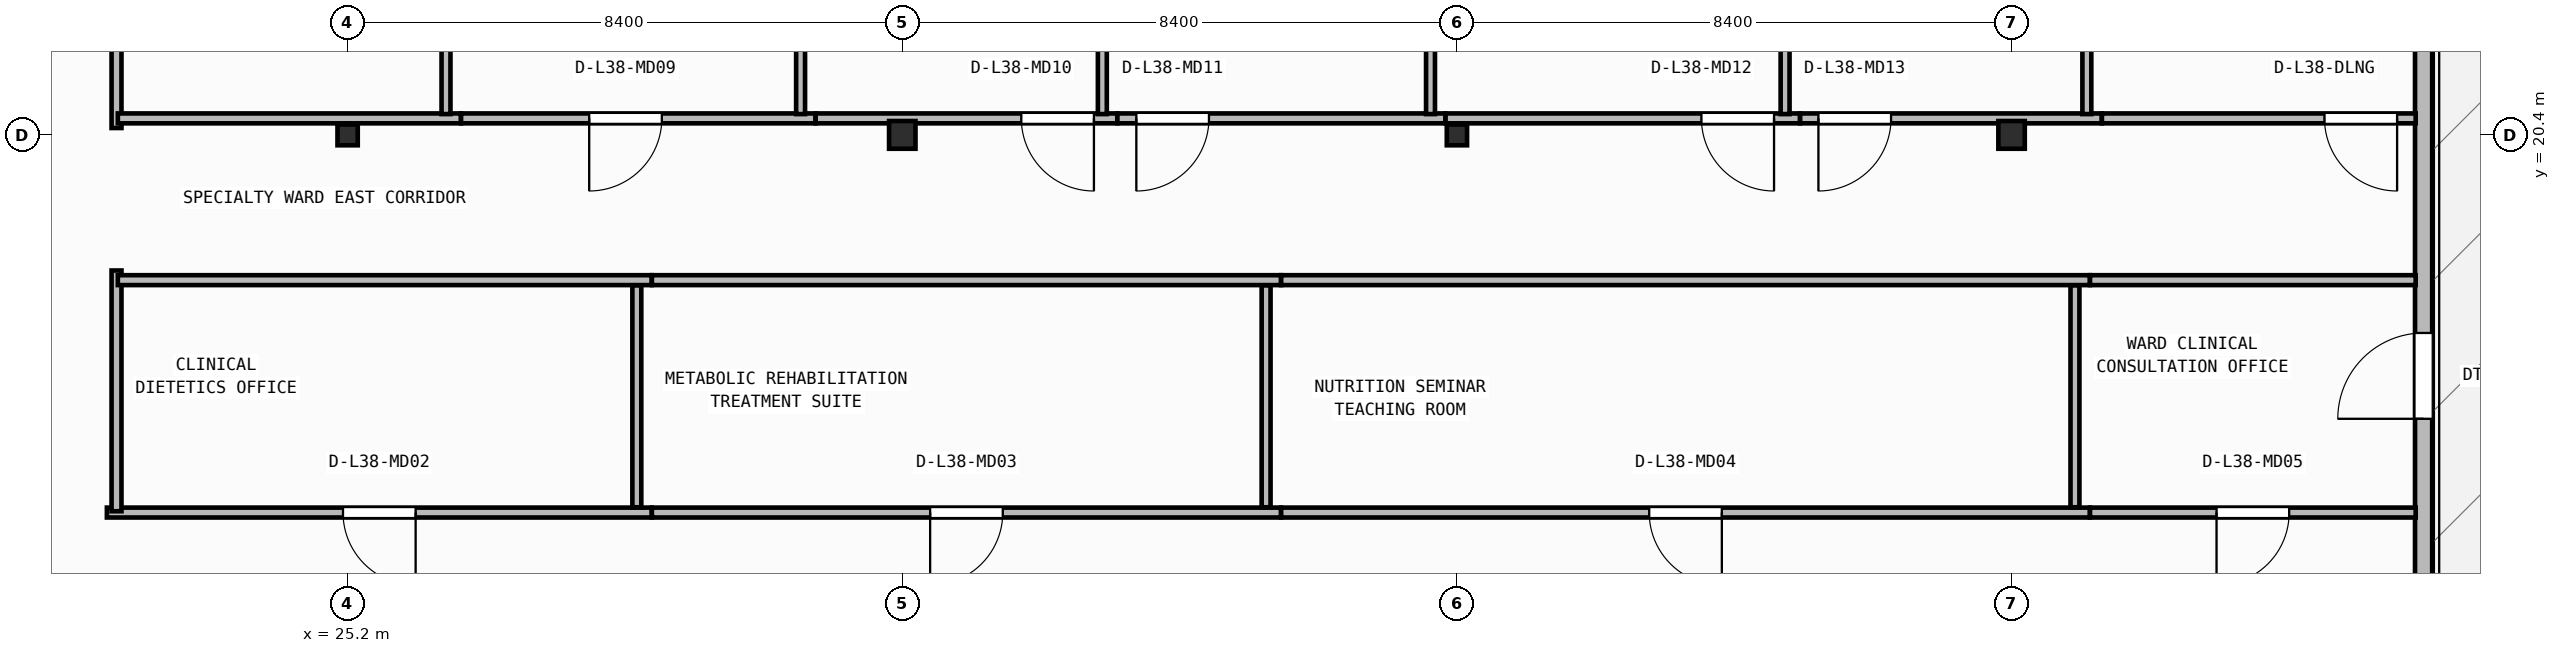
"""IFC4 building model, lengths in metres.
Left out: names, types, materials, properties, quantities, classifications, styles, units other than length and angle.
Written with IfcOpenShell. Run it as: python <this file> out.ifc"""

import sys

from ifc_helpers import new_model, si_unit, direction, frame, frame_2d, origin, origin_2d, place, context, subcontext, project, spatial, rectangle, i_section, extrude, element, fill, save


model = new_model("IFC4")
c1 = context("Model", 3, precision=1e-05, world=origin(), true_north=direction((0.0, 1.0)))
c2 = subcontext(c1, "Body", "Model", "MODEL_VIEW")
j1 = project(units=[si_unit("LENGTHUNIT", "METRE"), si_unit("PLANEANGLEUNIT", "RADIAN")], contexts=[c1])
p1 = place(None, origin())
s1 = spatial("IfcSite", under=j1, at=p1, CompositionType="ELEMENT")
p2 = place(p1, origin())
s2 = spatial("IfcBuilding", under=s1, at=p2, CompositionType="ELEMENT")
p3 = place(p2, frame((0.0, 0.0, 154.7)))
s3 = spatial("IfcBuildingStorey", under=s2, at=p3, CompositionType="ELEMENT", Elevation=154.7)
p4 = place(p3, frame((25.2, 20.4, 0.0), z_axis=(0.0, 0.0, 1.0), x_axis=(1.0, 0.0, 0.0)))
e1 = element("IfcColumn", 1, at=p4, inside=s3, PredefinedType="COLUMN", context=c2, shape_type="SweptSolid", body=[
    extrude(i_section(OverallWidth=0.307, OverallDepth=0.315, WebThickness=0.012, FlangeThickness=0.019, FilletRadius=0.017, at=origin_2d()), origin(), (0.0, 0.0, 1.0), 3.95),
])
p5 = place(p3, frame((33.6, 20.4, 0.0), z_axis=(0.0, 0.0, 1.0), x_axis=(1.0, 0.0, 0.0)))
e2 = element("IfcColumn", 2, at=p5, inside=s3, PredefinedType="COLUMN", context=c2, shape_type="SweptSolid", body=[
    extrude(i_section(OverallWidth=0.4, OverallDepth=0.42, WebThickness=0.025, FlangeThickness=0.04, at=origin_2d()), origin(), (0.0, 0.0, 1.0), 3.95),
])
p6 = place(p3, frame((42.0, 20.4, 0.0), z_axis=(0.0, 0.0, 1.0), x_axis=(1.0, 0.0, 0.0)))
e3 = element("IfcColumn", 3, at=p6, inside=s3, PredefinedType="COLUMN", context=c2, shape_type="SweptSolid", body=[
    extrude(i_section(OverallWidth=0.307, OverallDepth=0.315, WebThickness=0.012, FlangeThickness=0.019, FilletRadius=0.017, at=origin_2d()), origin(), (0.0, 0.0, 1.0), 3.95),
])
p7 = place(p3, frame((50.4, 20.4, 0.0), z_axis=(0.0, 0.0, 1.0), x_axis=(1.0, 0.0, 0.0)))
e4 = element("IfcColumn", 4, at=p7, inside=s3, PredefinedType="COLUMN", context=c2, shape_type="SweptSolid", body=[
    extrude(i_section(OverallWidth=0.4, OverallDepth=0.42, WebThickness=0.025, FlangeThickness=0.04, at=origin_2d()), origin(), (0.0, 0.0, 1.0), 3.95),
])
p8 = place(p3, frame((56.64, 6.86, 0.0), z_axis=(0.0, 0.0, 1.0), x_axis=(0.0, 1.0, 0.0)))
e5 = element("IfcWall", 5, at=p8, inside=s3, PredefinedType="STANDARD", context=c2, shape_type="SweptSolid", body=[
    extrude(rectangle(XDim=23.48, YDim=0.26, at=frame_2d((11.74, 0.0))), origin(), (0.0, 0.0, 1.0), 3.71),
])
p9 = place(p8, frame((9.24, 0.0, 0.0)))
e6 = element("IfcOpeningElement", 6, at=p9, cuts=e5, PredefinedType="OPENING", context=c2, shape_type="SweptSolid", body=[
    extrude(rectangle(XDim=1.3, YDim=2.15, at=frame_2d((0.65, 1.075))), frame((0.0, 0.14, 0.0), z_axis=(0.0, -1.0, 0.0), x_axis=(1.0, 0.0, 0.0)), (0.0, 0.0, 1.0), 0.28),
])
p10 = place(p3, frame((29.806, 14.68, 0.0), z_axis=(0.0, 0.0, 1.0), x_axis=(-1.0, 0.0, 0.0)))
e7 = element("IfcWall", 7, at=p10, inside=s3, PredefinedType="PARTITIONING", context=c2, shape_type="SweptSolid", body=[
    extrude(rectangle(XDim=8.252, YDim=0.15, at=frame_2d((4.126, 0.0))), origin(), (0.0, 0.0, 1.0), 3.71),
])
p11 = place(p10, frame((3.576, 0.0, 0.0)))
e8 = element("IfcOpeningElement", 8, at=p11, cuts=e7, PredefinedType="OPENING", context=c2, shape_type="SweptSolid", body=[
    extrude(rectangle(XDim=1.1, YDim=2.1, at=frame_2d((0.55, 1.05))), frame((0.0, 0.085, 0.0), z_axis=(0.0, -1.0, 0.0), x_axis=(1.0, 0.0, 0.0)), (0.0, 0.0, 1.0), 0.17),
])
p12 = place(p3, frame((39.336, 14.68, 0.0), z_axis=(0.0, 0.0, 1.0), x_axis=(-1.0, 0.0, 0.0)))
e9 = element("IfcWall", 9, at=p12, inside=s3, PredefinedType="PARTITIONING", context=c2, shape_type="SweptSolid", body=[
    extrude(rectangle(XDim=9.528, YDim=0.15, at=frame_2d((4.764, 0.0))), origin(), (0.0, 0.0, 1.0), 3.71),
])
p13 = place(p12, frame((4.214, 0.0, 0.0)))
e10 = element("IfcOpeningElement", 10, at=p13, cuts=e9, PredefinedType="OPENING", context=c2, shape_type="SweptSolid", body=[
    extrude(rectangle(XDim=1.1, YDim=2.1, at=frame_2d((0.55, 1.05))), frame((0.0, 0.085, 0.0), z_axis=(0.0, -1.0, 0.0), x_axis=(1.0, 0.0, 0.0)), (0.0, 0.0, 1.0), 0.17),
])
p14 = place(p3, frame((51.586, 14.68, 0.0), z_axis=(0.0, 0.0, 1.0), x_axis=(-1.0, 0.0, 0.0)))
e11 = element("IfcWall", 11, at=p14, inside=s3, PredefinedType="PARTITIONING", context=c2, shape_type="SweptSolid", body=[
    extrude(rectangle(XDim=12.248, YDim=0.15, at=frame_2d((6.124, 0.0))), origin(), (0.0, 0.0, 1.0), 3.71),
])
p15 = place(p14, frame((5.574, 0.0, 0.0)))
e12 = element("IfcOpeningElement", 12, at=p15, cuts=e11, PredefinedType="OPENING", context=c2, shape_type="SweptSolid", body=[
    extrude(rectangle(XDim=1.1, YDim=2.1, at=frame_2d((0.55, 1.05))), frame((0.0, 0.085, 0.0), z_axis=(0.0, -1.0, 0.0), x_axis=(1.0, 0.0, 0.0)), (0.0, 0.0, 1.0), 0.17),
])
p16 = place(p3, frame((56.52, 14.68, 0.0), z_axis=(0.0, 0.0, 1.0), x_axis=(-1.0, 0.0, 0.0)))
e13 = element("IfcWall", 13, at=p16, inside=s3, PredefinedType="PARTITIONING", context=c2, shape_type="SweptSolid", body=[
    extrude(rectangle(XDim=4.932, YDim=0.15, at=frame_2d((2.466, 0.0))), origin(), (0.0, 0.0, 1.0), 3.71),
])
p17 = place(p16, frame((1.916, 0.0, 0.0)))
e14 = element("IfcOpeningElement", 14, at=p17, cuts=e13, PredefinedType="OPENING", context=c2, shape_type="SweptSolid", body=[
    extrude(rectangle(XDim=1.1, YDim=2.1, at=frame_2d((0.55, 1.05))), frame((0.0, 0.085, 0.0), z_axis=(0.0, -1.0, 0.0), x_axis=(1.0, 0.0, 0.0)), (0.0, 0.0, 1.0), 0.17),
])
p18 = place(p3, frame((21.7, 14.7, 0.0), z_axis=(0.0, 0.0, 1.0), x_axis=(0.0, 1.0, 0.0)))
e15 = element("IfcWall", 15, at=p18, inside=s3, PredefinedType="PARTITIONING", context=c2, shape_type="SweptSolid", body=[
    extrude(rectangle(XDim=3.646, YDim=0.15, at=frame_2d((1.823, 0.0))), origin(), (0.0, 0.0, 1.0), 3.71),
])
p19 = place(p3, frame((21.7, 20.504, 0.0), z_axis=(0.0, 0.0, 1.0), x_axis=(0.0, 1.0, 0.0)))
e16 = element("IfcWall", 16, at=p19, inside=s3, PredefinedType="PARTITIONING", context=c2, shape_type="SweptSolid", body=[
    extrude(rectangle(XDim=6.756, YDim=0.15, at=frame_2d((3.378, 0.0))), origin(), (0.0, 0.0, 1.0), 3.71),
])
p20 = place(p19, frame((2.828, 0.0, 0.0)))
e17 = element("IfcOpeningElement", 17, at=p20, cuts=e16, PredefinedType="OPENING", context=c2, shape_type="SweptSolid", body=[
    extrude(rectangle(XDim=1.1, YDim=2.1, at=frame_2d((0.55, 1.05))), frame((0.0, 0.085, 0.0), z_axis=(0.0, -1.0, 0.0), x_axis=(1.0, 0.0, 0.0)), (0.0, 0.0, 1.0), 0.17),
])
p21 = place(p3, frame((21.72, 18.2, 0.0), z_axis=(0.0, 0.0, 1.0), x_axis=(1.0, 0.0, 0.0)))
e18 = element("IfcWall", 18, at=p21, inside=s3, PredefinedType="PARTITIONING", context=c2, shape_type="SweptSolid", body=[
    extrude(rectangle(XDim=8.086, YDim=0.15, at=frame_2d((4.043, 0.0))), origin(), (0.0, 0.0, 1.0), 3.71),
])
p22 = place(p3, frame((29.808, 18.2, 0.0), z_axis=(0.0, 0.0, 1.0), x_axis=(1.0, 0.0, 0.0)))
e19 = element("IfcWall", 19, at=p22, inside=s3, PredefinedType="PARTITIONING", context=c2, shape_type="SweptSolid", body=[
    extrude(rectangle(XDim=9.528, YDim=0.15, at=frame_2d((4.764, 0.0))), origin(), (0.0, 0.0, 1.0), 3.71),
])
p23 = place(p3, frame((39.338, 18.2, 0.0), z_axis=(0.0, 0.0, 1.0), x_axis=(1.0, 0.0, 0.0)))
e20 = element("IfcWall", 20, at=p23, inside=s3, PredefinedType="PARTITIONING", context=c2, shape_type="SweptSolid", body=[
    extrude(rectangle(XDim=12.248, YDim=0.15, at=frame_2d((6.124, 0.0))), origin(), (0.0, 0.0, 1.0), 3.71),
])
p24 = place(p3, frame((51.588, 18.2, 0.0), z_axis=(0.0, 0.0, 1.0), x_axis=(1.0, 0.0, 0.0)))
e21 = element("IfcWall", 21, at=p24, inside=s3, PredefinedType="PARTITIONING", context=c2, shape_type="SweptSolid", body=[
    extrude(rectangle(XDim=4.932, YDim=0.15, at=frame_2d((2.466, 0.0))), origin(), (0.0, 0.0, 1.0), 3.71),
])
p25 = place(p3, frame((26.916, 20.65, 0.0), z_axis=(0.0, 0.0, 1.0), x_axis=(-1.0, 0.0, 0.0)))
e22 = element("IfcWall", 22, at=p25, inside=s3, PredefinedType="PARTITIONING", context=c2, shape_type="SweptSolid", body=[
    extrude(rectangle(XDim=5.196, YDim=0.15, at=frame_2d((2.598, 0.0))), origin(), (0.0, 0.0, 1.0), 3.083),
])
p26 = place(p3, frame((32.286, 20.65, 0.0), z_axis=(0.0, 0.0, 1.0), x_axis=(-1.0, 0.0, 0.0)))
e23 = element("IfcWall", 23, at=p26, inside=s3, PredefinedType="PARTITIONING", context=c2, shape_type="SweptSolid", body=[
    extrude(rectangle(XDim=5.368, YDim=0.15, at=frame_2d((2.684, 0.0))), origin(), (0.0, 0.0, 1.0), 3.083),
])
p27 = place(p26, frame((2.327, 0.0, 0.0)))
e24 = element("IfcOpeningElement", 24, at=p27, cuts=e23, PredefinedType="OPENING", context=c2, shape_type="SweptSolid", body=[
    extrude(rectangle(XDim=1.1, YDim=2.1, at=frame_2d((0.55, 1.05))), frame((0.0, 0.085, 0.0), z_axis=(0.0, -1.0, 0.0), x_axis=(1.0, 0.0, 0.0)), (0.0, 0.0, 1.0), 0.17),
])
p28 = place(p3, frame((36.856, 20.65, 0.0), z_axis=(0.0, 0.0, 1.0), x_axis=(-1.0, 0.0, 0.0)))
e25 = element("IfcWall", 25, at=p28, inside=s3, PredefinedType="PARTITIONING", context=c2, shape_type="SweptSolid", body=[
    extrude(rectangle(XDim=4.568, YDim=0.15, at=frame_2d((2.284, 0.0))), origin(), (0.0, 0.0, 1.0), 3.083),
])
p29 = place(p28, frame((0.354, 0.0, 0.0)))
e26 = element("IfcOpeningElement", 26, at=p29, cuts=e25, PredefinedType="OPENING", context=c2, shape_type="SweptSolid", body=[
    extrude(rectangle(XDim=1.1, YDim=2.1, at=frame_2d((0.55, 1.05))), frame((0.0, 0.085, 0.0), z_axis=(0.0, -1.0, 0.0), x_axis=(1.0, 0.0, 0.0)), (0.0, 0.0, 1.0), 0.17),
])
p30 = place(p3, frame((41.826, 20.65, 0.0), z_axis=(0.0, 0.0, 1.0), x_axis=(-1.0, 0.0, 0.0)))
e27 = element("IfcWall", 27, at=p30, inside=s3, PredefinedType="PARTITIONING", context=c2, shape_type="SweptSolid", body=[
    extrude(rectangle(XDim=4.968, YDim=0.15, at=frame_2d((2.484, 0.0))), origin(), (0.0, 0.0, 1.0), 3.083),
])
p31 = place(p30, frame((3.581, 0.0, 0.0)))
e28 = element("IfcOpeningElement", 28, at=p31, cuts=e27, PredefinedType="OPENING", context=c2, shape_type="SweptSolid", body=[
    extrude(rectangle(XDim=1.1, YDim=2.1, at=frame_2d((0.55, 1.05))), frame((0.0, 0.085, 0.0), z_axis=(0.0, -1.0, 0.0), x_axis=(1.0, 0.0, 0.0)), (0.0, 0.0, 1.0), 0.17),
])
p32 = place(p3, frame((47.196, 20.65, 0.0), z_axis=(0.0, 0.0, 1.0), x_axis=(-1.0, 0.0, 0.0)))
e29 = element("IfcWall", 29, at=p32, inside=s3, PredefinedType="PARTITIONING", context=c2, shape_type="SweptSolid", body=[
    extrude(rectangle(XDim=5.368, YDim=0.15, at=frame_2d((2.684, 0.0))), origin(), (0.0, 0.0, 1.0), 3.083),
])
p33 = place(p32, frame((0.393, 0.0, 0.0)))
e30 = element("IfcOpeningElement", 30, at=p33, cuts=e29, PredefinedType="OPENING", context=c2, shape_type="SweptSolid", body=[
    extrude(rectangle(XDim=1.1, YDim=2.1, at=frame_2d((0.55, 1.05))), frame((0.0, 0.085, 0.0), z_axis=(0.0, -1.0, 0.0), x_axis=(1.0, 0.0, 0.0)), (0.0, 0.0, 1.0), 0.17),
])
p34 = place(p3, frame((51.766, 20.65, 0.0), z_axis=(0.0, 0.0, 1.0), x_axis=(-1.0, 0.0, 0.0)))
e31 = element("IfcWall", 31, at=p34, inside=s3, PredefinedType="PARTITIONING", context=c2, shape_type="SweptSolid", body=[
    extrude(rectangle(XDim=4.568, YDim=0.15, at=frame_2d((2.284, 0.0))), origin(), (0.0, 0.0, 1.0), 3.083),
])
p35 = place(p34, frame((3.191, 0.0, 0.0)))
e32 = element("IfcOpeningElement", 32, at=p35, cuts=e31, PredefinedType="OPENING", context=c2, shape_type="SweptSolid", body=[
    extrude(rectangle(XDim=1.1, YDim=2.1, at=frame_2d((0.55, 1.05))), frame((0.0, 0.085, 0.0), z_axis=(0.0, -1.0, 0.0), x_axis=(1.0, 0.0, 0.0)), (0.0, 0.0, 1.0), 0.17),
])
p36 = place(p3, frame((56.52, 20.65, 0.0), z_axis=(0.0, 0.0, 1.0), x_axis=(-1.0, 0.0, 0.0)))
e33 = element("IfcWall", 33, at=p36, inside=s3, PredefinedType="PARTITIONING", context=c2, shape_type="SweptSolid", body=[
    extrude(rectangle(XDim=4.752, YDim=0.15, at=frame_2d((2.376, 0.0))), origin(), (0.0, 0.0, 1.0), 3.71),
])
p37 = place(p36, frame((0.281, 0.0, 0.0)))
e34 = element("IfcOpeningElement", 34, at=p37, cuts=e33, PredefinedType="OPENING", context=c2, shape_type="SweptSolid", body=[
    extrude(rectangle(XDim=1.1, YDim=2.1, at=frame_2d((0.55, 1.05))), frame((0.0, 0.085, 0.0), z_axis=(0.0, -1.0, 0.0), x_axis=(1.0, 0.0, 0.0)), (0.0, 0.0, 1.0), 0.17),
])
for number, where, z_axis, x_axis in (
    (35, (29.58, 14.76, 0.0), (0.0, 0.0, 1.0), (0.0, 1.0, 0.0)),
    (36, (39.11, 14.76, 0.0), (0.0, 0.0, 1.0), (0.0, 1.0, 0.0)),
    (37, (51.36, 14.76, 0.0), (0.0, 0.0, 1.0), (0.0, 1.0, 0.0)),
):
    element("IfcWall", number, at=place(p3, frame(where, z_axis=z_axis, x_axis=x_axis)), inside=s3, PredefinedType="PARTITIONING", context=c2, shape_type="SweptSolid", body=[
        extrude(rectangle(XDim=3.36, YDim=0.135, at=frame_2d((1.68, 0.0))), origin(), (0.0, 0.0, 1.0), 3.71),
    ])
for number, where, z_axis, x_axis in (
    (38, (26.69, 20.715, 0.0), (0.0, 0.0, 1.0), (0.0, 1.0, 0.0)),
    (39, (32.06, 20.715, 0.0), (0.0, 0.0, 1.0), (0.0, 1.0, 0.0)),
    (40, (36.63, 20.715, 0.0), (0.0, 0.0, 1.0), (0.0, 1.0, 0.0)),
):
    element("IfcWall", number, at=place(p3, frame(where, z_axis=z_axis, x_axis=x_axis)), inside=s3, PredefinedType="PARTITIONING", context=c2, shape_type="SweptSolid", body=[
        extrude(rectangle(XDim=6.385, YDim=0.135, at=frame_2d((3.192, 0.0))), origin(), (0.0, 0.0, 1.0), 3.71),
    ])
p38 = place(p3, frame((41.6, 20.715, 0.0), z_axis=(0.0, 0.0, 1.0), x_axis=(0.0, 1.0, 0.0)))
e41 = element("IfcWall", 41, at=p38, inside=s3, PredefinedType="PARTITIONING", context=c2, shape_type="SweptSolid", body=[
    extrude(rectangle(XDim=6.385, YDim=0.135, at=frame_2d((3.192, 0.0))), origin(), (0.0, 0.0, 1.0), 3.152),
])
for number, where, z_axis, x_axis in (
    (42, (46.97, 20.715, 0.0), (0.0, 0.0, 1.0), (0.0, 1.0, 0.0)),
    (43, (51.54, 20.715, 0.0), (0.0, 0.0, 1.0), (0.0, 1.0, 0.0)),
):
    element("IfcWall", number, at=place(p3, frame(where, z_axis=z_axis, x_axis=x_axis)), inside=s3, PredefinedType="PARTITIONING", context=c2, shape_type="SweptSolid", body=[
        extrude(rectangle(XDim=6.385, YDim=0.135, at=frame_2d((3.192, 0.0))), origin(), (0.0, 0.0, 1.0), 3.71),
    ])
p39 = place(p9, origin())
e44 = element("IfcDoor", 44, at=p39, inside=s3, OperationType="SINGLE_SWING_LEFT", PredefinedType="DOOR", context=c2, shape_type="SweptSolid", body=[
    extrude(rectangle(XDim=1.3, YDim=2.15, at=frame_2d((0.65, 1.075))), frame((0.0, 0.025, 0.0), z_axis=(0.0, -1.0, 0.0), x_axis=(1.0, 0.0, 0.0)), (0.0, 0.0, 1.0), 0.05),
])
fill(e6, e44)
p40 = place(p11, origin())
e45 = element("IfcDoor", 45, at=p40, inside=s3, OperationType="SINGLE_SWING_LEFT", PredefinedType="DOOR", context=c2, shape_type="SweptSolid", body=[
    extrude(rectangle(XDim=1.1, YDim=2.1, at=frame_2d((0.55, 1.05))), frame((0.0, 0.025, 0.0), z_axis=(0.0, -1.0, 0.0), x_axis=(1.0, 0.0, 0.0)), (0.0, 0.0, 1.0), 0.05),
])
fill(e8, e45)
p41 = place(p13, origin())
e46 = element("IfcDoor", 46, at=p41, inside=s3, OperationType="SINGLE_SWING_RIGHT", PredefinedType="DOOR", context=c2, shape_type="SweptSolid", body=[
    extrude(rectangle(XDim=1.1, YDim=2.1, at=frame_2d((0.55, 1.05))), frame((0.0, 0.025, 0.0), z_axis=(0.0, -1.0, 0.0), x_axis=(1.0, 0.0, 0.0)), (0.0, 0.0, 1.0), 0.05),
])
fill(e10, e46)
p42 = place(p15, origin())
e47 = element("IfcDoor", 47, at=p42, inside=s3, OperationType="SINGLE_SWING_LEFT", PredefinedType="DOOR", context=c2, shape_type="SweptSolid", body=[
    extrude(rectangle(XDim=1.1, YDim=2.1, at=frame_2d((0.55, 1.05))), frame((0.0, 0.025, 0.0), z_axis=(0.0, -1.0, 0.0), x_axis=(1.0, 0.0, 0.0)), (0.0, 0.0, 1.0), 0.05),
])
fill(e12, e47)
p43 = place(p17, origin())
e48 = element("IfcDoor", 48, at=p43, inside=s3, OperationType="SINGLE_SWING_RIGHT", PredefinedType="DOOR", context=c2, shape_type="SweptSolid", body=[
    extrude(rectangle(XDim=1.1, YDim=2.1, at=frame_2d((0.55, 1.05))), frame((0.0, 0.025, 0.0), z_axis=(0.0, -1.0, 0.0), x_axis=(1.0, 0.0, 0.0)), (0.0, 0.0, 1.0), 0.05),
])
fill(e14, e48)
p44 = place(p27, origin())
e49 = element("IfcDoor", 49, at=p44, inside=s3, OperationType="SINGLE_SWING_RIGHT", PredefinedType="DOOR", context=c2, shape_type="SweptSolid", body=[
    extrude(rectangle(XDim=1.1, YDim=2.1, at=frame_2d((0.55, 1.05))), frame((0.0, 0.025, 0.0), z_axis=(0.0, -1.0, 0.0), x_axis=(1.0, 0.0, 0.0)), (0.0, 0.0, 1.0), 0.05),
])
fill(e24, e49)
p45 = place(p29, origin())
e50 = element("IfcDoor", 50, at=p45, inside=s3, OperationType="SINGLE_SWING_LEFT", PredefinedType="DOOR", context=c2, shape_type="SweptSolid", body=[
    extrude(rectangle(XDim=1.1, YDim=2.1, at=frame_2d((0.55, 1.05))), frame((0.0, 0.025, 0.0), z_axis=(0.0, -1.0, 0.0), x_axis=(1.0, 0.0, 0.0)), (0.0, 0.0, 1.0), 0.05),
])
fill(e26, e50)
p46 = place(p31, origin())
e51 = element("IfcDoor", 51, at=p46, inside=s3, OperationType="SINGLE_SWING_RIGHT", PredefinedType="DOOR", context=c2, shape_type="SweptSolid", body=[
    extrude(rectangle(XDim=1.1, YDim=2.1, at=frame_2d((0.55, 1.05))), frame((0.0, 0.025, 0.0), z_axis=(0.0, -1.0, 0.0), x_axis=(1.0, 0.0, 0.0)), (0.0, 0.0, 1.0), 0.05),
])
fill(e28, e51)
p47 = place(p33, origin())
e52 = element("IfcDoor", 52, at=p47, inside=s3, OperationType="SINGLE_SWING_LEFT", PredefinedType="DOOR", context=c2, shape_type="SweptSolid", body=[
    extrude(rectangle(XDim=1.1, YDim=2.1, at=frame_2d((0.55, 1.05))), frame((0.0, 0.025, 0.0), z_axis=(0.0, -1.0, 0.0), x_axis=(1.0, 0.0, 0.0)), (0.0, 0.0, 1.0), 0.05),
])
fill(e30, e52)
p48 = place(p35, origin())
e53 = element("IfcDoor", 53, at=p48, inside=s3, OperationType="SINGLE_SWING_RIGHT", PredefinedType="DOOR", context=c2, shape_type="SweptSolid", body=[
    extrude(rectangle(XDim=1.1, YDim=2.1, at=frame_2d((0.55, 1.05))), frame((0.0, 0.025, 0.0), z_axis=(0.0, -1.0, 0.0), x_axis=(1.0, 0.0, 0.0)), (0.0, 0.0, 1.0), 0.05),
])
fill(e32, e53)
p49 = place(p37, origin())
e54 = element("IfcDoor", 54, at=p49, inside=s3, OperationType="SINGLE_SWING_LEFT", PredefinedType="DOOR", context=c2, shape_type="SweptSolid", body=[
    extrude(rectangle(XDim=1.1, YDim=2.1, at=frame_2d((0.55, 1.05))), frame((0.0, 0.025, 0.0), z_axis=(0.0, -1.0, 0.0), x_axis=(1.0, 0.0, 0.0)), (0.0, 0.0, 1.0), 0.05),
])
fill(e34, e54)
save(model, sys.argv[1])
